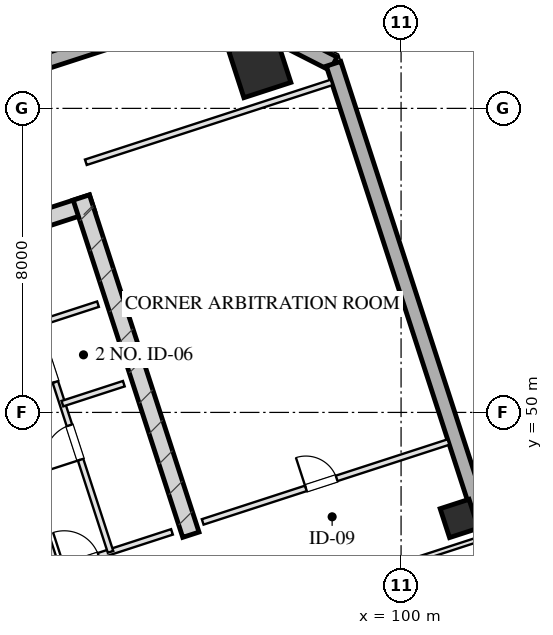
"""IFC4 building model, lengths in metres.
Left out: names, types, materials, properties, quantities, classifications, styles, units other than length and angle.
Written with IfcOpenShell. Run it as: python <this file> out.ifc"""

import sys

from ifc_helpers import new_model, si_unit, direction, frame, frame_2d, origin, origin_2d, place, context, subcontext, project, spatial, rectangle, hollow_rectangle, extrude, element, fill, save


model = new_model("IFC4")
c1 = context("Model", 3, precision=1e-05, world=origin(), true_north=direction((0.0, 1.0)))
c2 = subcontext(c1, "Body", "Model", "MODEL_VIEW")
j1 = project(units=[si_unit("LENGTHUNIT", "METRE"), si_unit("PLANEANGLEUNIT", "RADIAN")], contexts=[c1])
p1 = place(None, origin())
s1 = spatial("IfcSite", under=j1, at=p1, CompositionType="ELEMENT")
p2 = place(p1, origin())
s2 = spatial("IfcBuilding", under=s1, at=p2, CompositionType="ELEMENT")
p3 = place(p2, frame((0.0, 0.0, 188.6)))
s3 = spatial("IfcBuildingStorey", under=s2, at=p3, CompositionType="ELEMENT", Elevation=188.6)
p4 = place(p3, frame((76.415, 50.489, 0.0), z_axis=(0.0, 0.0, 1.0), x_axis=(0.951056810414, 0.309016089169, 0.0)))
e1 = element("IfcWall", 1, at=p4, inside=s3, PredefinedType="SHEAR", context=c2, shape_type="SweptSolid", body=[
    extrude(rectangle(XDim=16.25, YDim=0.45, at=frame_2d((8.125, 0.0))), origin(), (0.0, 0.0, 1.0), 3.45),
])
p5 = place(p3, frame((94.469, 46.781, 0.0), z_axis=(0.0, 0.0, 1.0), x_axis=(-0.309004419953, 0.951060601881, 0.0)))
e2 = element("IfcWall", 2, at=p5, inside=s3, PredefinedType="SHEAR", context=c2, shape_type="SweptSolid", body=[
    extrude(rectangle(XDim=9.33, YDim=0.45, at=frame_2d((4.665, 0.0))), origin(), (0.0, 0.0, 1.0), 3.45),
])
p6 = place(p3, frame((96.281, 59.099, 0.0), z_axis=(0.0, 0.0, 1.0), x_axis=(0.951056516295, 0.309016994375, 0.0)))
e3 = element("IfcColumn", 3, at=p6, inside=s3, PredefinedType="COLUMN", context=c2, shape_type="SweptSolid", body=[
    extrude(hollow_rectangle(XDim=1.3, YDim=1.3, WallThickness=0.045, at=origin_2d()), origin(), (0.0, 0.0, 1.0), 3.451),
])
p7 = place(p3, frame((101.532, 47.21, 0.0), z_axis=(0.0, 0.0, 1.0), x_axis=(0.951056516295, 0.309016994375, 0.0)))
e4 = element("IfcColumn", 4, at=p7, inside=s3, PredefinedType="COLUMN", context=c2, shape_type="SweptSolid", body=[
    extrude(hollow_rectangle(XDim=0.8, YDim=0.8, WallThickness=0.028, at=origin_2d()), origin(), (0.0, 0.0, 1.0), 3.451),
])
p8 = place(p3, frame((70.092, 52.556, 0.0), z_axis=(0.0, 0.0, 1.0), x_axis=(0.951057580055, 0.30901372044, 0.0)))
e5 = element("IfcWall", 5, at=p8, inside=s3, PredefinedType="SOLIDWALL", context=c2, shape_type="SweptSolid", body=[
    extrude(rectangle(XDim=26.4, YDim=0.4, at=frame_2d((13.2, 0.0))), origin(), (0.0, 0.0, 1.0), 2.61),
])
p9 = place(p3, frame((95.199, 60.714, 0.0), z_axis=(0.0, 0.0, 1.0), x_axis=(0.891020832027, -0.453962417932, 0.0)))
e6 = element("IfcWall", 6, at=p9, inside=s3, PredefinedType="SOLIDWALL", context=c2, shape_type="SweptSolid", body=[
    extrude(rectangle(XDim=3.394, YDim=0.4, at=frame_2d((1.697, 0.0))), origin(), (0.0, 0.0, 1.0), 2.61),
])
p10 = place(p3, frame((98.224, 59.173, 0.0), z_axis=(0.0, 0.0, 1.0), x_axis=(0.309014228706, -0.951057414911, 0.0)))
e7 = element("IfcWall", 7, at=p10, inside=s3, PredefinedType="SOLIDWALL", context=c2, shape_type="SweptSolid", body=[
    extrude(rectangle(XDim=42.8, YDim=0.4, at=frame_2d((21.4, 0.0))), origin(), (0.0, 0.0, 1.0), 2.61),
])
p11 = place(p10, frame((17.75, 0.0, 0.75)))
e8 = element("IfcOpeningElement", 8, at=p11, cuts=e7, PredefinedType="OPENING", context=c2, shape_type="SweptSolid", body=[
    extrude(rectangle(XDim=2.1, YDim=1.46, at=frame_2d((1.05, 0.73))), frame((0.0, 0.21, 0.0), z_axis=(0.0, -1.0, 0.0), x_axis=(1.0, 0.0, 0.0)), (0.0, 0.0, 1.0), 0.42),
])
p12 = place(p10, frame((13.95, 0.0, 0.75)))
e9 = element("IfcOpeningElement", 9, at=p12, cuts=e7, PredefinedType="OPENING", context=c2, shape_type="SweptSolid", body=[
    extrude(rectangle(XDim=2.1, YDim=1.46, at=frame_2d((1.05, 0.73))), frame((0.0, 0.21, 0.0), z_axis=(0.0, -1.0, 0.0), x_axis=(1.0, 0.0, 0.0)), (0.0, 0.0, 1.0), 0.42),
])
p13 = place(p10, frame((23.95, 0.0, 0.0)))
e10 = element("IfcOpeningElement", 10, at=p13, cuts=e7, PredefinedType="OPENING", context=c2, shape_type="SweptSolid", body=[
    extrude(rectangle(XDim=1.1, YDim=2.15, at=frame_2d((0.55, 1.075))), frame((0.0, 0.21, 0.0), z_axis=(0.0, -1.0, 0.0), x_axis=(1.0, 0.0, 0.0)), (0.0, 0.0, 1.0), 0.42),
])
p14 = place(p3, frame((90.928, 45.868, 0.0), z_axis=(0.0, 0.0, 1.0), x_axis=(-0.309042196757, 0.951048327176, 0.0)))
e11 = element("IfcWall", 11, at=p14, inside=s3, PredefinedType="PARTITIONING", context=c2, shape_type="SweptSolid", body=[
    extrude(rectangle(XDim=8.43, YDim=0.2, at=frame_2d((4.215, 0.0))), origin(), (0.0, 0.0, 1.0), 3.175),
])
p15 = place(p3, frame((90.928, 45.868, 0.0), z_axis=(0.0, 0.0, 1.0), x_axis=(0.951059297078, 0.309008435874, 0.0)))
e12 = element("IfcWall", 12, at=p15, inside=s3, PredefinedType="PARTITIONING", context=c2, shape_type="SweptSolid", body=[
    extrude(rectangle(XDim=3.2, YDim=0.15, at=frame_2d((1.6, 0.0))), origin(), (0.0, 0.0, 1.0), 3.175),
])
p16 = place(p15, frame((0.22, 0.0, 0.0)))
e13 = element("IfcOpeningElement", 13, at=p16, cuts=e12, PredefinedType="OPENING", context=c2, shape_type="SweptSolid", body=[
    extrude(rectangle(XDim=0.95, YDim=2.05, at=frame_2d((0.475, 1.025))), frame((0.0, 0.085, 0.0), z_axis=(0.0, -1.0, 0.0), x_axis=(1.0, 0.0, 0.0)), (0.0, 0.0, 1.0), 0.17),
])
p17 = place(p3, frame((92.355, 46.331, 0.0), z_axis=(0.0, 0.0, 1.0), x_axis=(-0.309007490203, 0.951059604335, 0.0)))
e14 = element("IfcWall", 14, at=p17, inside=s3, PredefinedType="PARTITIONING", context=c2, shape_type="SweptSolid", body=[
    extrude(rectangle(XDim=8.43, YDim=0.15, at=frame_2d((4.215, 0.0))), origin(), (0.0, 0.0, 1.0), 3.175),
])
p18 = place(p17, frame((2.55, 0.0, 0.0)))
e15 = element("IfcOpeningElement", 15, at=p18, cuts=e14, PredefinedType="OPENING", context=c2, shape_type="SweptSolid", body=[
    extrude(rectangle(XDim=0.95, YDim=2.05, at=frame_2d((0.475, 1.025))), frame((0.0, 0.085, 0.0), z_axis=(0.0, -1.0, 0.0), x_axis=(1.0, 0.0, 0.0)), (0.0, 0.0, 1.0), 0.17),
])
p19 = place(p17, frame((4.7, 0.0, 0.0)))
e16 = element("IfcOpeningElement", 16, at=p19, cuts=e14, PredefinedType="OPENING", context=c2, shape_type="SweptSolid", body=[
    extrude(rectangle(XDim=0.9, YDim=2.05, at=frame_2d((0.45, 1.025))), frame((0.0, 0.085, 0.0), z_axis=(0.0, -1.0, 0.0), x_axis=(1.0, 0.0, 0.0)), (0.0, 0.0, 1.0), 0.17),
])
p20 = place(p17, frame((6.8, 0.0, 0.0)))
e17 = element("IfcOpeningElement", 17, at=p20, cuts=e14, PredefinedType="OPENING", context=c2, shape_type="SweptSolid", body=[
    extrude(rectangle(XDim=0.9, YDim=2.05, at=frame_2d((0.45, 1.025))), frame((0.0, 0.085, 0.0), z_axis=(0.0, -1.0, 0.0), x_axis=(1.0, 0.0, 0.0)), (0.0, 0.0, 1.0), 0.17),
])
p21 = place(p3, frame((91.088, 50.23, 0.0), z_axis=(0.0, 0.0, 1.0), x_axis=(0.951054116971, 0.309024378638, 0.0)))
e18 = element("IfcWall", 18, at=p21, inside=s3, PredefinedType="PARTITIONING", context=c2, shape_type="SweptSolid", body=[
    extrude(rectangle(XDim=1.7, YDim=0.15, at=frame_2d((0.85, 0.0))), origin(), (0.0, 0.0, 1.0), 3.175),
])
p22 = place(p3, frame((90.408, 52.323, 0.0), z_axis=(0.0, 0.0, 1.0), x_axis=(0.951040401051, 0.309066587596, 0.0)))
e19 = element("IfcWall", 19, at=p22, inside=s3, PredefinedType="PARTITIONING", context=c2, shape_type="SweptSolid", body=[
    extrude(rectangle(XDim=1.7, YDim=0.15, at=frame_2d((0.85, 0.0))), origin(), (0.0, 0.0, 1.0), 3.175),
])
p23 = place(p3, frame((91.705, 56.582, 0.0), z_axis=(0.0, 0.0, 1.0), x_axis=(0.951057811516, 0.309013008068, 0.0)))
e20 = element("IfcWall", 20, at=p23, inside=s3, PredefinedType="PARTITIONING", context=c2, shape_type="SweptSolid", body=[
    extrude(rectangle(XDim=6.8, YDim=0.15, at=frame_2d((3.4, 0.0))), origin(), (0.0, 0.0, 1.0), 3.175),
])
p24 = place(p3, frame((94.78, 47.119, 0.0), z_axis=(0.0, 0.0, 1.0), x_axis=(0.951057811516, 0.309013008068, 0.0)))
e21 = element("IfcWall", 21, at=p24, inside=s3, PredefinedType="PARTITIONING", context=c2, shape_type="SweptSolid", body=[
    extrude(rectangle(XDim=6.8, YDim=0.15, at=frame_2d((3.4, 0.0))), origin(), (0.0, 0.0, 1.0), 3.175),
])
p25 = place(p24, frame((2.856, 0.0, 0.0)))
e22 = element("IfcOpeningElement", 22, at=p25, cuts=e21, PredefinedType="OPENING", context=c2, shape_type="SweptSolid", body=[
    extrude(rectangle(XDim=0.85, YDim=2.05, at=frame_2d((0.425, 1.025))), frame((0.0, 0.085, 0.0), z_axis=(0.0, -1.0, 0.0), x_axis=(1.0, 0.0, 0.0)), (0.0, 0.0, 1.0), 0.17),
])
p26 = place(p3, frame((90.71, 42.979, 0.0), z_axis=(0.0, 0.0, 1.0), x_axis=(0.95105853842, 0.309010770845, 0.0)))
e23 = element("IfcWall", 23, at=p26, inside=s3, PredefinedType="PARTITIONING", context=c2, shape_type="SweptSolid", body=[
    extrude(rectangle(XDim=11.95, YDim=0.12, at=frame_2d((5.975, 0.0))), origin(), (0.0, 0.0, 1.0), 3.175),
])
p27 = place(p16, origin())
e24 = element("IfcDoor", 24, at=p27, inside=s3, OperationType="SINGLE_SWING_LEFT", PredefinedType="DOOR", context=c2, shape_type="SweptSolid", body=[
    extrude(rectangle(XDim=0.95, YDim=2.05, at=frame_2d((0.475, 1.025))), frame((0.0, 0.025, 0.0), z_axis=(0.0, -1.0, 0.0), x_axis=(1.0, 0.0, 0.0)), (0.0, 0.0, 1.0), 0.05),
])
fill(e13, e24)
p28 = place(p18, origin())
e25 = element("IfcDoor", 25, at=p28, inside=s3, OperationType="SINGLE_SWING_LEFT", PredefinedType="DOOR", context=c2, shape_type="SweptSolid", body=[
    extrude(rectangle(XDim=0.95, YDim=2.05, at=frame_2d((0.475, 1.025))), frame((0.0, 0.025, 0.0), z_axis=(0.0, -1.0, 0.0), x_axis=(1.0, 0.0, 0.0)), (0.0, 0.0, 1.0), 0.05),
])
fill(e15, e25)
p29 = place(p19, origin())
e26 = element("IfcDoor", 26, at=p29, inside=s3, OperationType="SINGLE_SWING_LEFT", PredefinedType="DOOR", context=c2, shape_type="SweptSolid", body=[
    extrude(rectangle(XDim=0.9, YDim=2.05, at=frame_2d((0.45, 1.025))), frame((0.0, 0.025, 0.0), z_axis=(0.0, -1.0, 0.0), x_axis=(1.0, 0.0, 0.0)), (0.0, 0.0, 1.0), 0.05),
])
fill(e16, e26)
p30 = place(p25, origin())
e27 = element("IfcDoor", 27, at=p30, inside=s3, OperationType="SINGLE_SWING_LEFT", PredefinedType="DOOR", context=c2, shape_type="SweptSolid", body=[
    extrude(rectangle(XDim=0.85, YDim=2.05, at=frame_2d((0.425, 1.025))), frame((0.0, 0.025, 0.0), z_axis=(0.0, -1.0, 0.0), x_axis=(1.0, 0.0, 0.0)), (0.0, 0.0, 1.0), 0.05),
])
fill(e22, e27)
save(model, sys.argv[1])
